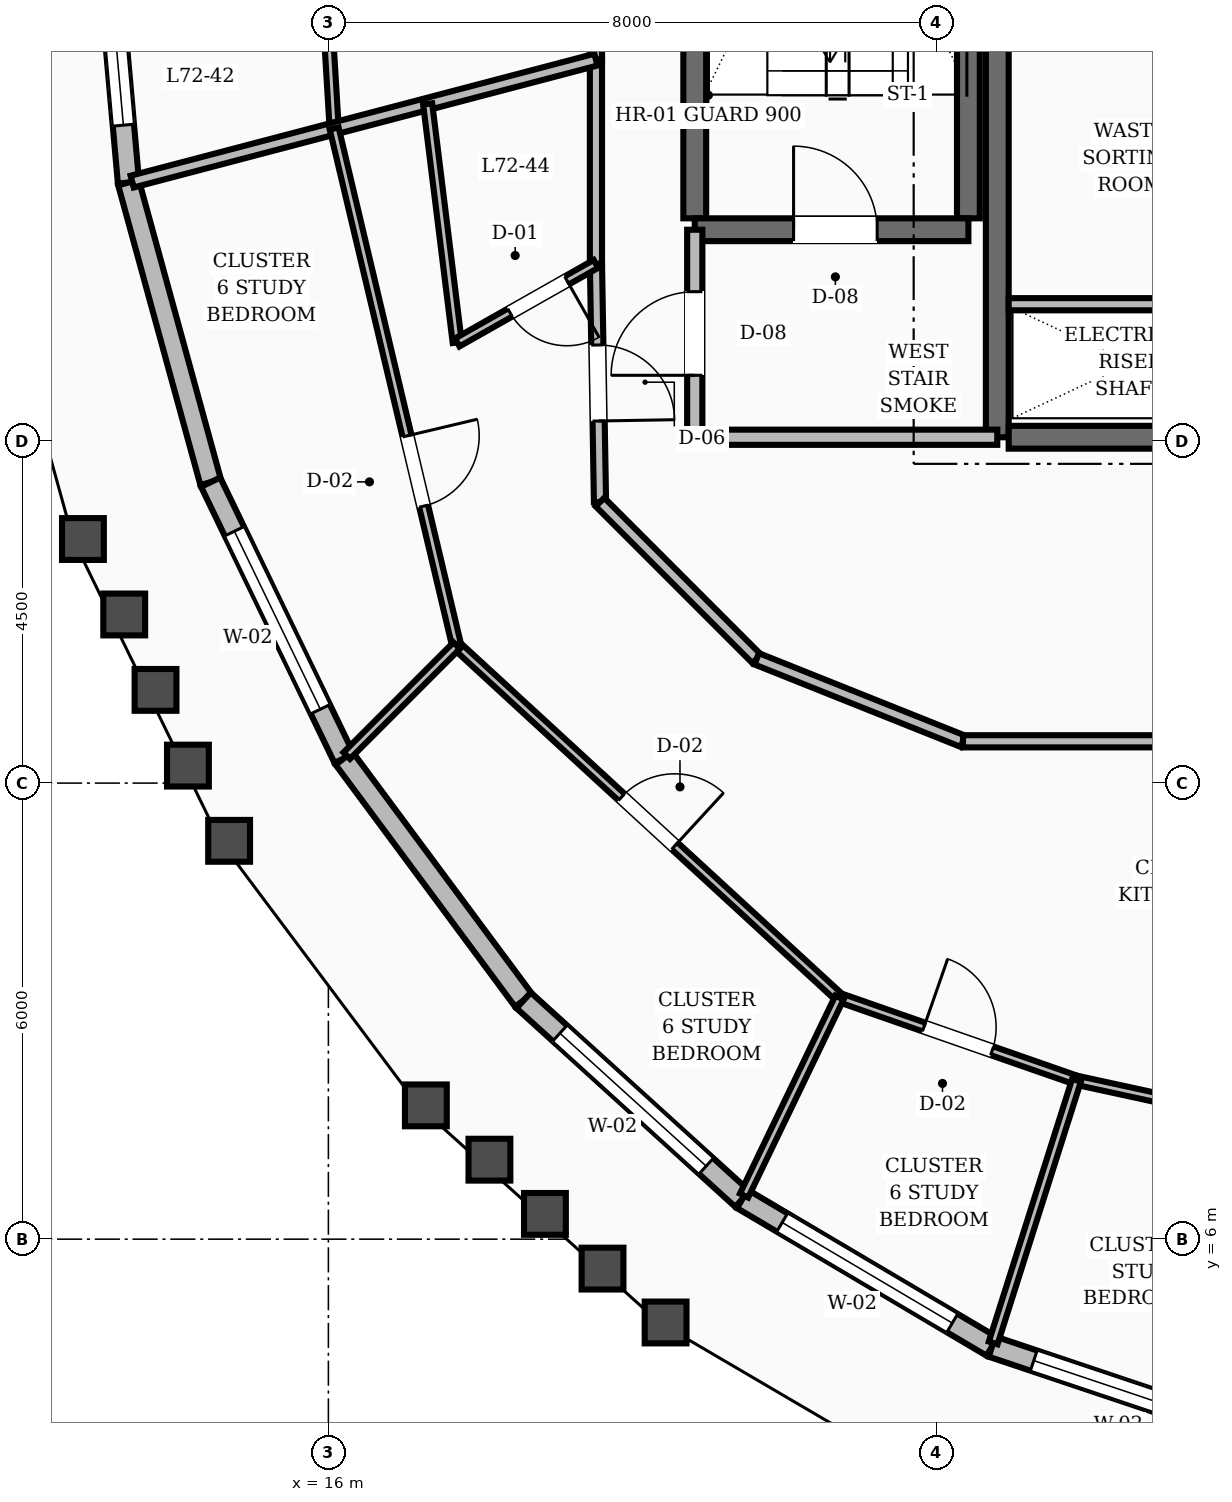
"""IFC4 building model, lengths in metres.
Left out: names, types, materials, properties, quantities, classifications, styles, units other than length and angle.
Written with IfcOpenShell. Run it as: python <this file> out.ifc"""

import sys

from ifc_helpers import new_model, si_unit, direction, frame, frame_2d, origin, place, context, subcontext, project, spatial, rectangle, extrude, element, fill, save


model = new_model("IFC4")
c1 = context("Model", 3, precision=1e-05, world=origin(), true_north=direction((0.0, 1.0)))
c2 = subcontext(c1, "Body", "Model", "MODEL_VIEW")
j1 = project(units=[si_unit("LENGTHUNIT", "METRE"), si_unit("PLANEANGLEUNIT", "RADIAN")], contexts=[c1])
p1 = place(None, origin())
s1 = spatial("IfcSite", under=j1, at=p1, CompositionType="ELEMENT")
p2 = place(p1, origin())
s2 = spatial("IfcBuilding", under=s1, at=p2, CompositionType="ELEMENT")
p3 = place(p2, frame((0.0, 0.0, 276.0)))
s3 = spatial("IfcBuildingStorey", under=s2, at=p3, CompositionType="ELEMENT", Elevation=276.0)
p4 = place(p3, frame((24.8, 16.55, 0.0), z_axis=(0.0, 0.0, 1.0), x_axis=(0.0, 1.0, 0.0)))
e1 = element("IfcWall", 1, at=p4, inside=s3, PredefinedType="SHEAR", context=c2, shape_type="SweptSolid", body=[
    extrude(rectangle(XDim=6.3, YDim=0.3, at=frame_2d((3.15, 0.0))), origin(), (0.0, 0.0, 1.0), 3.6),
])
p5 = place(p3, frame((24.95, 16.55, 0.0), z_axis=(0.0, 0.0, 1.0), x_axis=(1.0, 0.0, 0.0)))
e2 = element("IfcWall", 2, at=p5, inside=s3, PredefinedType="SHEAR", context=c2, shape_type="SweptSolid", body=[
    extrude(rectangle(XDim=3.25, YDim=0.3, at=frame_2d((1.625, 0.0))), origin(), (0.0, 0.0, 1.0), 3.6),
])
for number, where, z_axis, x_axis in (
    (3, (20.82, 19.43, 0.0), (0.0, 0.0, 1.0), (0.0, 1.0, 0.0)),
    (4, (24.42, 19.43, 0.0), (0.0, 0.0, 1.0), (0.0, 1.0, 0.0)),
):
    element("IfcWall", number, at=place(p3, frame(where, z_axis=z_axis, x_axis=x_axis)), inside=s3, PredefinedType="SHEAR", context=c2, shape_type="SweptSolid", body=[
        extrude(rectangle(XDim=8.74, YDim=0.3, at=frame_2d((4.37, 0.0))), origin(), (0.0, 0.0, 1.0), 3.6),
    ])
p6 = place(p3, frame((20.82, 19.28, 0.0), z_axis=(0.0, 0.0, 1.0), x_axis=(1.0, 0.0, 0.0)))
e5 = element("IfcWall", 5, at=p6, inside=s3, PredefinedType="SHEAR", context=c2, shape_type="SweptSolid", body=[
    extrude(rectangle(XDim=3.6, YDim=0.3, at=frame_2d((1.8, 0.0))), origin(), (0.0, 0.0, 1.0), 3.6),
])
p7 = place(p6, frame((1.3, 0.0, 0.0)))
e6 = element("IfcOpeningElement", 6, at=p7, cuts=e5, PredefinedType="OPENING", context=c2, shape_type="SweptSolid", body=[
    extrude(rectangle(XDim=1.1, YDim=2.1, at=frame_2d((0.55, 1.05))), frame((0.0, 0.16, 0.0), z_axis=(0.0, -1.0, 0.0), x_axis=(1.0, 0.0, 0.0)), (0.0, 0.0, 1.0), 0.32),
])
p8 = place(p3, frame((13.005, 24.0, 0.0), z_axis=(0.0, 0.0, 1.0), x_axis=(0.08868496751, -0.996059725387, 0.0)))
e7 = element("IfcWall", 7, at=p8, inside=s3, PredefinedType="STANDARD", context=c2, shape_type="SweptSolid", body=[
    extrude(rectangle(XDim=4.115, YDim=0.28, at=frame_2d((2.058, 0.0))), origin(), (0.0, 0.0, 1.0), 2.88),
])
p9 = place(p8, frame((0.758, 0.0, 0.8)))
e8 = element("IfcOpeningElement", 8, at=p9, cuts=e7, PredefinedType="OPENING", context=c2, shape_type="SweptSolid", body=[
    extrude(rectangle(XDim=2.6, YDim=1.65, at=frame_2d((1.3, 0.825))), frame((0.0, 0.15, 0.0), z_axis=(0.0, -1.0, 0.0), x_axis=(1.0, 0.0, 0.0)), (0.0, 0.0, 1.0), 0.3),
])
p10 = place(p3, frame((13.37, 19.901, 0.0), z_axis=(0.0, 0.0, 1.0), x_axis=(0.264426176781, -0.964405929592, 0.0)))
e9 = element("IfcWall", 9, at=p10, inside=s3, PredefinedType="STANDARD", context=c2, shape_type="SweptSolid", body=[
    extrude(rectangle(XDim=4.087, YDim=0.28, at=frame_2d((2.044, 0.0))), origin(), (0.0, 0.0, 1.0), 2.88),
])
p11 = place(p3, frame((14.451, 15.959, 0.0), z_axis=(0.0, 0.0, 1.0), x_axis=(0.435070554904, -0.900396363973, 0.0)))
e10 = element("IfcWall", 10, at=p11, inside=s3, PredefinedType="STANDARD", context=c2, shape_type="SweptSolid", body=[
    extrude(rectangle(XDim=4.035, YDim=0.28, at=frame_2d((2.017, 0.0))), origin(), (0.0, 0.0, 1.0), 2.88),
])
p12 = place(p11, frame((0.717, 0.0, 0.8)))
e11 = element("IfcOpeningElement", 11, at=p12, cuts=e10, PredefinedType="OPENING", context=c2, shape_type="SweptSolid", body=[
    extrude(rectangle(XDim=2.6, YDim=1.65, at=frame_2d((1.3, 0.825))), frame((0.0, 0.15, 0.0), z_axis=(0.0, -1.0, 0.0), x_axis=(1.0, 0.0, 0.0)), (0.0, 0.0, 1.0), 0.3),
])
p13 = place(p3, frame((16.206, 12.326, 0.0), z_axis=(0.0, 0.0, 1.0), x_axis=(0.595834112452, -0.803107533546, 0.0)))
e12 = element("IfcWall", 12, at=p13, inside=s3, PredefinedType="STANDARD", context=c2, shape_type="SweptSolid", body=[
    extrude(rectangle(XDim=3.965, YDim=0.28, at=frame_2d((1.982, 0.0))), origin(), (0.0, 0.0, 1.0), 2.88),
])
p14 = place(p3, frame((18.569, 9.142, 0.0), z_axis=(0.0, 0.0, 1.0), x_axis=(0.740383189604, -0.672185043386, 0.0)))
e13 = element("IfcWall", 13, at=p14, inside=s3, PredefinedType="STANDARD", context=c2, shape_type="SweptSolid", body=[
    extrude(rectangle(XDim=3.888, YDim=0.28, at=frame_2d((1.944, 0.0))), origin(), (0.0, 0.0, 1.0), 2.88),
])
p15 = place(p14, frame((0.644, 0.0, 0.8)))
e14 = element("IfcOpeningElement", 14, at=p15, cuts=e13, PredefinedType="OPENING", context=c2, shape_type="SweptSolid", body=[
    extrude(rectangle(XDim=2.6, YDim=1.65, at=frame_2d((1.3, 0.825))), frame((0.0, 0.15, 0.0), z_axis=(0.0, -1.0, 0.0), x_axis=(1.0, 0.0, 0.0)), (0.0, 0.0, 1.0), 0.3),
])
p16 = place(p3, frame((21.447, 6.529, 0.0), z_axis=(0.0, 0.0, 1.0), x_axis=(0.860795275747, -0.508951366294, 0.0)))
e15 = element("IfcWall", 15, at=p16, inside=s3, PredefinedType="STANDARD", context=c2, shape_type="SweptSolid", body=[
    extrude(rectangle(XDim=3.815, YDim=0.28, at=frame_2d((1.907, 0.0))), origin(), (0.0, 0.0, 1.0), 2.88),
])
p17 = place(p16, frame((0.608, 0.0, 0.8)))
e16 = element("IfcOpeningElement", 16, at=p17, cuts=e15, PredefinedType="OPENING", context=c2, shape_type="SweptSolid", body=[
    extrude(rectangle(XDim=2.6, YDim=1.65, at=frame_2d((1.3, 0.825))), frame((0.0, 0.15, 0.0), z_axis=(0.0, -1.0, 0.0), x_axis=(1.0, 0.0, 0.0)), (0.0, 0.0, 1.0), 0.3),
])
p18 = place(p3, frame((24.731, 4.587, 0.0), z_axis=(0.0, 0.0, 1.0), x_axis=(0.948038268377, -0.318156316445, 0.0)))
e17 = element("IfcWall", 17, at=p18, inside=s3, PredefinedType="STANDARD", context=c2, shape_type="SweptSolid", body=[
    extrude(rectangle(XDim=3.759, YDim=0.28, at=frame_2d((1.879, 0.0))), origin(), (0.0, 0.0, 1.0), 2.88),
])
p19 = place(p18, frame((0.579, 0.0, 0.8)))
e18 = element("IfcOpeningElement", 18, at=p19, cuts=e17, PredefinedType="OPENING", context=c2, shape_type="SweptSolid", body=[
    extrude(rectangle(XDim=2.6, YDim=1.65, at=frame_2d((1.3, 0.825))), frame((0.0, 0.15, 0.0), z_axis=(0.0, -1.0, 0.0), x_axis=(1.0, 0.0, 0.0)), (0.0, 0.0, 1.0), 0.3),
])
p20 = place(p3, frame((20.82, 16.55, 0.0), z_axis=(0.0, 0.0, 1.0), x_axis=(0.0, 1.0, 0.0)))
e19 = element("IfcWall", 19, at=p20, inside=s3, PredefinedType="SOLIDWALL", context=c2, shape_type="SweptSolid", body=[
    extrude(rectangle(XDim=2.73, YDim=0.2, at=frame_2d((1.365, 0.0))), origin(), (0.0, 0.0, 1.0), 2.87),
])
p21 = place(p20, frame((0.815, 0.0, 0.0)))
e20 = element("IfcOpeningElement", 20, at=p21, cuts=e19, PredefinedType="OPENING", context=c2, shape_type="SweptSolid", body=[
    extrude(rectangle(XDim=1.1, YDim=2.1, at=frame_2d((0.55, 1.05))), frame((0.0, 0.11, 0.0), z_axis=(0.0, -1.0, 0.0), x_axis=(1.0, 0.0, 0.0)), (0.0, 0.0, 1.0), 0.22),
])
p22 = place(p3, frame((20.82, 16.55, 0.0), z_axis=(0.0, 0.0, 1.0), x_axis=(1.0, 0.0, 0.0)))
e21 = element("IfcWall", 21, at=p22, inside=s3, PredefinedType="SOLIDWALL", context=c2, shape_type="SweptSolid", body=[
    extrude(rectangle(XDim=3.98, YDim=0.2, at=frame_2d((1.99, 0.0))), origin(), (0.0, 0.0, 1.0), 2.87),
])
p23 = place(p3, frame((24.95, 18.3, 0.0), z_axis=(0.0, 0.0, 1.0), x_axis=(1.0, 0.0, 0.0)))
e22 = element("IfcWall", 22, at=p23, inside=s3, PredefinedType="SOLIDWALL", context=c2, shape_type="SweptSolid", body=[
    extrude(rectangle(XDim=3.2, YDim=0.16, at=frame_2d((1.6, 0.0))), origin(), (0.0, 0.0, 1.0), 2.87),
])
p24 = place(p3, frame((19.52, 24.0, 0.0), z_axis=(0.0, 0.0, 1.0), x_axis=(0.0, -1.0, 0.0)))
e23 = element("IfcWall", 23, at=p24, inside=s3, PredefinedType="SOLIDWALL", context=c2, shape_type="SweptSolid", body=[
    extrude(rectangle(XDim=2.482, YDim=0.16, at=frame_2d((1.241, 0.0))), origin(), (0.0, 0.0, 1.0), 2.87),
])
p25 = place(p3, frame((19.52, 21.518, 0.0), z_axis=(0.0, 0.0, 1.0), x_axis=(0.0, -1.0, 0.0)))
e24 = element("IfcWall", 24, at=p25, inside=s3, PredefinedType="SOLIDWALL", context=c2, shape_type="SweptSolid", body=[
    extrude(rectangle(XDim=2.687, YDim=0.16, at=frame_2d((1.344, 0.0))), origin(), (0.0, 0.0, 1.0), 2.87),
])
p26 = place(p3, frame((19.52, 18.831, 0.0), z_axis=(0.0, 0.0, 1.0), x_axis=(0.016981035134, -0.999855811828, 0.0)))
e25 = element("IfcWall", 25, at=p26, inside=s3, PredefinedType="SOLIDWALL", context=c2, shape_type="SweptSolid", body=[
    extrude(rectangle(XDim=3.134, YDim=0.16, at=frame_2d((1.567, 0.0))), origin(), (0.0, 0.0, 1.0), 2.87),
])
p27 = place(p26, frame((1.067, 0.0, 0.0)))
e26 = element("IfcOpeningElement", 26, at=p27, cuts=e25, PredefinedType="OPENING", context=c2, shape_type="SweptSolid", body=[
    extrude(rectangle(XDim=1.0, YDim=2.1, at=frame_2d((0.5, 1.05))), frame((0.0, 0.09, 0.0), z_axis=(0.0, -1.0, 0.0), x_axis=(1.0, 0.0, 0.0)), (0.0, 0.0, 1.0), 0.18),
])
p28 = place(p3, frame((19.573, 15.697, 0.0), z_axis=(0.0, 0.0, 1.0), x_axis=(0.707106781187, -0.707106781187, 0.0)))
e27 = element("IfcWall", 27, at=p28, inside=s3, PredefinedType="SOLIDWALL", context=c2, shape_type="SweptSolid", body=[
    extrude(rectangle(XDim=2.916, YDim=0.16, at=frame_2d((1.458, 0.0))), origin(), (0.0, 0.0, 1.0), 2.87),
])
p29 = place(p3, frame((21.635, 13.635, 0.0), z_axis=(0.0, 0.0, 1.0), x_axis=(0.92856882165, -0.371160266542, 0.0)))
e28 = element("IfcWall", 28, at=p29, inside=s3, PredefinedType="SOLIDWALL", context=c2, shape_type="SweptSolid", body=[
    extrude(rectangle(XDim=2.923, YDim=0.16, at=frame_2d((1.461, 0.0))), origin(), (0.0, 0.0, 1.0), 2.87),
])
p30 = place(p3, frame((24.349, 12.55, 0.0), z_axis=(0.0, 0.0, 1.0), x_axis=(1.0, 0.0, 0.0)))
e29 = element("IfcWall", 29, at=p30, inside=s3, PredefinedType="SOLIDWALL", context=c2, shape_type="SweptSolid", body=[
    extrude(rectangle(XDim=2.908, YDim=0.16, at=frame_2d((1.454, 0.0))), origin(), (0.0, 0.0, 1.0), 2.87),
])
p31 = place(p3, frame((15.872, 24.0, 0.0), z_axis=(0.0, 0.0, 1.0), x_axis=(0.060277885003, -0.998181635064, 0.0)))
e30 = element("IfcWall", 30, at=p31, inside=s3, PredefinedType="PARTITIONING", context=c2, shape_type="SweptSolid", body=[
    extrude(rectangle(XDim=3.394, YDim=0.12, at=frame_2d((1.697, 0.0))), origin(), (0.0, 0.0, 1.0), 2.87),
])
p32 = place(p31, frame((1.222, 0.0, 0.0)))
e31 = element("IfcOpeningElement", 31, at=p32, cuts=e30, PredefinedType="OPENING", context=c2, shape_type="SweptSolid", body=[
    extrude(rectangle(XDim=0.95, YDim=2.1, at=frame_2d((0.475, 1.05))), frame((0.0, 0.07, 0.0), z_axis=(0.0, -1.0, 0.0), x_axis=(1.0, 0.0, 0.0)), (0.0, 0.0, 1.0), 0.14),
])
p33 = place(p3, frame((19.52, 21.518, 0.0), z_axis=(0.0, 0.0, 1.0), x_axis=(-0.967130154466, -0.254281859995, 0.0)))
e32 = element("IfcWall", 32, at=p33, inside=s3, PredefinedType="SOLIDWALL", context=c2, shape_type="SweptSolid", body=[
    extrude(rectangle(XDim=6.309, YDim=0.16, at=frame_2d((3.154, 0.0))), origin(), (0.0, 0.0, 1.0), 2.87),
])
p34 = place(p3, frame((17.306, 20.936, 0.0), z_axis=(0.0, 0.0, 1.0), x_axis=(0.12312261881, -0.99239146547, 0.0)))
e33 = element("IfcWall", 33, at=p34, inside=s3, PredefinedType="PARTITIONING", context=c2, shape_type="SweptSolid", body=[
    extrude(rectangle(XDim=3.163, YDim=0.12, at=frame_2d((1.582, 0.0))), origin(), (0.0, 0.0, 1.0), 2.87),
])
p35 = place(p3, frame((19.52, 18.831, 0.0), z_axis=(0.0, 0.0, 1.0), x_axis=(-0.870085428534, -0.49290095055, 0.0)))
e34 = element("IfcWall", 34, at=p35, inside=s3, PredefinedType="PARTITIONING", context=c2, shape_type="SweptSolid", body=[
    extrude(rectangle(XDim=2.097, YDim=0.12, at=frame_2d((1.049, 0.0))), origin(), (0.0, 0.0, 1.0), 2.87),
])
p36 = place(p35, frame((0.44, 0.0, 0.0)))
e35 = element("IfcOpeningElement", 35, at=p36, cuts=e34, PredefinedType="OPENING", context=c2, shape_type="SweptSolid", body=[
    extrude(rectangle(XDim=0.86, YDim=2.1, at=frame_2d((0.43, 1.05))), frame((0.0, 0.07, 0.0), z_axis=(0.0, -1.0, 0.0), x_axis=(1.0, 0.0, 0.0)), (0.0, 0.0, 1.0), 0.14),
])
p37 = place(p3, frame((16.076, 20.612, 0.0), z_axis=(0.0, 0.0, 1.0), x_axis=(0.230512502036, -0.973069363615, 0.0)))
e36 = element("IfcWall", 36, at=p37, inside=s3, PredefinedType="PARTITIONING", context=c2, shape_type="SweptSolid", body=[
    extrude(rectangle(XDim=6.991, YDim=0.12, at=frame_2d((3.496, 0.0))), origin(), (0.0, 0.0, 1.0), 2.87),
])
p38 = place(p37, frame((4.156, 0.0, 0.0)))
e37 = element("IfcOpeningElement", 37, at=p38, cuts=e36, PredefinedType="OPENING", context=c2, shape_type="SweptSolid", body=[
    extrude(rectangle(XDim=0.95, YDim=2.1, at=frame_2d((0.475, 1.05))), frame((0.0, 0.07, 0.0), z_axis=(0.0, -1.0, 0.0), x_axis=(1.0, 0.0, 0.0)), (0.0, 0.0, 1.0), 0.14),
])
p39 = place(p3, frame((17.688, 13.809, 0.0), z_axis=(0.0, 0.0, 1.0), x_axis=(0.736103094718, -0.67686943641, 0.0)))
e38 = element("IfcWall", 38, at=p39, inside=s3, PredefinedType="PARTITIONING", context=c2, shape_type="SweptSolid", body=[
    extrude(rectangle(XDim=6.842, YDim=0.12, at=frame_2d((3.421, 0.0))), origin(), (0.0, 0.0, 1.0), 2.87),
])
p40 = place(p39, frame((2.946, 0.0, 0.0)))
e39 = element("IfcOpeningElement", 39, at=p40, cuts=e38, PredefinedType="OPENING", context=c2, shape_type="SweptSolid", body=[
    extrude(rectangle(XDim=0.95, YDim=2.1, at=frame_2d((0.475, 1.05))), frame((0.0, 0.07, 0.0), z_axis=(0.0, -1.0, 0.0), x_axis=(1.0, 0.0, 0.0)), (0.0, 0.0, 1.0), 0.14),
])
p41 = place(p3, frame((17.688, 13.809, 0.0), z_axis=(0.0, 0.0, 1.0), x_axis=(-0.706689063462, -0.707524252293, 0.0)))
e40 = element("IfcWall", 40, at=p41, inside=s3, PredefinedType="PARTITIONING", context=c2, shape_type="SweptSolid", body=[
    extrude(rectangle(XDim=2.046, YDim=0.12, at=frame_2d((1.023, 0.0))), origin(), (0.0, 0.0, 1.0), 2.87),
])
p42 = place(p3, frame((22.724, 9.178, 0.0), z_axis=(0.0, 0.0, 1.0), x_axis=(0.944239204451, -0.329260269054, 0.0)))
e41 = element("IfcWall", 41, at=p42, inside=s3, PredefinedType="PARTITIONING", context=c2, shape_type="SweptSolid", body=[
    extrude(rectangle(XDim=3.302, YDim=0.12, at=frame_2d((1.651, 0.0))), origin(), (0.0, 0.0, 1.0), 2.87),
])
p43 = place(p42, frame((1.176, 0.0, 0.0)))
e42 = element("IfcOpeningElement", 42, at=p43, cuts=e41, PredefinedType="OPENING", context=c2, shape_type="SweptSolid", body=[
    extrude(rectangle(XDim=0.95, YDim=2.1, at=frame_2d((0.475, 1.05))), frame((0.0, 0.07, 0.0), z_axis=(0.0, -1.0, 0.0), x_axis=(1.0, 0.0, 0.0)), (0.0, 0.0, 1.0), 0.14),
])
p44 = place(p3, frame((22.724, 9.178, 0.0), z_axis=(0.0, 0.0, 1.0), x_axis=(-0.434196411504, -0.900818225968, 0.0)))
e43 = element("IfcWall", 43, at=p44, inside=s3, PredefinedType="PARTITIONING", context=c2, shape_type="SweptSolid", body=[
    extrude(rectangle(XDim=2.891, YDim=0.12, at=frame_2d((1.446, 0.0))), origin(), (0.0, 0.0, 1.0), 2.87),
])
p45 = place(p3, frame((25.843, 8.091, 0.0), z_axis=(0.0, 0.0, 1.0), x_axis=(0.977170072037, -0.21245858494, 0.0)))
e44 = element("IfcWall", 44, at=p45, inside=s3, PredefinedType="PARTITIONING", context=c2, shape_type="SweptSolid", body=[
    extrude(rectangle(XDim=3.152, YDim=0.12, at=frame_2d((1.576, 0.0))), origin(), (0.0, 0.0, 1.0), 2.87),
])
p46 = place(p45, frame((1.101, 0.0, 0.0)))
e45 = element("IfcOpeningElement", 45, at=p46, cuts=e44, PredefinedType="OPENING", context=c2, shape_type="SweptSolid", body=[
    extrude(rectangle(XDim=0.95, YDim=2.1, at=frame_2d((0.475, 1.05))), frame((0.0, 0.07, 0.0), z_axis=(0.0, -1.0, 0.0), x_axis=(1.0, 0.0, 0.0)), (0.0, 0.0, 1.0), 0.14),
])
p47 = place(p3, frame((25.843, 8.091, 0.0), z_axis=(0.0, 0.0, 1.0), x_axis=(-0.302397560597, -0.953181889959, 0.0)))
e46 = element("IfcWall", 46, at=p47, inside=s3, PredefinedType="PARTITIONING", context=c2, shape_type="SweptSolid", body=[
    extrude(rectangle(XDim=3.626, YDim=0.12, at=frame_2d((1.813, 0.0))), origin(), (0.0, 0.0, 1.0), 2.87),
])
p48 = place(p9, origin())
e47 = element("IfcWindow", 47, at=p48, inside=s3, PartitioningType="SINGLE_PANEL", PredefinedType="WINDOW", context=c2, shape_type="SweptSolid", body=[
    extrude(rectangle(XDim=2.6, YDim=1.65, at=frame_2d((1.3, 0.825))), frame((0.0, 0.03, 0.0), z_axis=(0.0, -1.0, 0.0), x_axis=(1.0, 0.0, 0.0)), (0.0, 0.0, 1.0), 0.06),
])
fill(e8, e47)
p49 = place(p12, origin())
e48 = element("IfcWindow", 48, at=p49, inside=s3, PartitioningType="SINGLE_PANEL", PredefinedType="WINDOW", context=c2, shape_type="SweptSolid", body=[
    extrude(rectangle(XDim=2.6, YDim=1.65, at=frame_2d((1.3, 0.825))), frame((0.0, 0.03, 0.0), z_axis=(0.0, -1.0, 0.0), x_axis=(1.0, 0.0, 0.0)), (0.0, 0.0, 1.0), 0.06),
])
fill(e11, e48)
p50 = place(p15, origin())
e49 = element("IfcWindow", 49, at=p50, inside=s3, PartitioningType="SINGLE_PANEL", PredefinedType="WINDOW", context=c2, shape_type="SweptSolid", body=[
    extrude(rectangle(XDim=2.6, YDim=1.65, at=frame_2d((1.3, 0.825))), frame((0.0, 0.03, 0.0), z_axis=(0.0, -1.0, 0.0), x_axis=(1.0, 0.0, 0.0)), (0.0, 0.0, 1.0), 0.06),
])
fill(e14, e49)
p51 = place(p17, origin())
e50 = element("IfcWindow", 50, at=p51, inside=s3, PartitioningType="SINGLE_PANEL", PredefinedType="WINDOW", context=c2, shape_type="SweptSolid", body=[
    extrude(rectangle(XDim=2.6, YDim=1.65, at=frame_2d((1.3, 0.825))), frame((0.0, 0.03, 0.0), z_axis=(0.0, -1.0, 0.0), x_axis=(1.0, 0.0, 0.0)), (0.0, 0.0, 1.0), 0.06),
])
fill(e16, e50)
p52 = place(p19, origin())
e51 = element("IfcWindow", 51, at=p52, inside=s3, PartitioningType="SINGLE_PANEL", PredefinedType="WINDOW", context=c2, shape_type="SweptSolid", body=[
    extrude(rectangle(XDim=2.6, YDim=1.65, at=frame_2d((1.3, 0.825))), frame((0.0, 0.03, 0.0), z_axis=(0.0, -1.0, 0.0), x_axis=(1.0, 0.0, 0.0)), (0.0, 0.0, 1.0), 0.06),
])
fill(e18, e51)
p53 = place(p7, origin())
e52 = element("IfcDoor", 52, at=p53, inside=s3, OperationType="SINGLE_SWING_LEFT", PredefinedType="DOOR", context=c2, shape_type="SweptSolid", body=[
    extrude(rectangle(XDim=1.1, YDim=2.1, at=frame_2d((0.55, 1.05))), frame((0.0, 0.025, 0.0), z_axis=(0.0, -1.0, 0.0), x_axis=(1.0, 0.0, 0.0)), (0.0, 0.0, 1.0), 0.05),
])
fill(e6, e52)
p54 = place(p21, origin())
e53 = element("IfcDoor", 53, at=p54, inside=s3, OperationType="SINGLE_SWING_LEFT", PredefinedType="DOOR", context=c2, shape_type="SweptSolid", body=[
    extrude(rectangle(XDim=1.1, YDim=2.1, at=frame_2d((0.55, 1.05))), frame((0.0, 0.025, 0.0), z_axis=(0.0, -1.0, 0.0), x_axis=(1.0, 0.0, 0.0)), (0.0, 0.0, 1.0), 0.05),
])
fill(e20, e53)
p55 = place(p36, origin())
e54 = element("IfcDoor", 54, at=p55, inside=s3, OperationType="SINGLE_SWING_LEFT", PredefinedType="DOOR", context=c2, shape_type="SweptSolid", body=[
    extrude(rectangle(XDim=0.86, YDim=2.1, at=frame_2d((0.43, 1.05))), frame((0.0, 0.025, 0.0), z_axis=(0.0, -1.0, 0.0), x_axis=(1.0, 0.0, 0.0)), (0.0, 0.0, 1.0), 0.05),
])
fill(e35, e54)
p56 = place(p27, origin())
e55 = element("IfcDoor", 55, at=p56, inside=s3, OperationType="SINGLE_SWING_RIGHT", PredefinedType="DOOR", context=c2, shape_type="SweptSolid", body=[
    extrude(rectangle(XDim=1.0, YDim=2.1, at=frame_2d((0.5, 1.05))), frame((0.0, 0.025, 0.0), z_axis=(0.0, -1.0, 0.0), x_axis=(1.0, 0.0, 0.0)), (0.0, 0.0, 1.0), 0.05),
])
fill(e26, e55)
p57 = place(p38, origin())
e56 = element("IfcDoor", 56, at=p57, inside=s3, OperationType="SINGLE_SWING_LEFT", PredefinedType="DOOR", context=c2, shape_type="SweptSolid", body=[
    extrude(rectangle(XDim=0.95, YDim=2.1, at=frame_2d((0.475, 1.05))), frame((0.0, 0.025, 0.0), z_axis=(0.0, -1.0, 0.0), x_axis=(1.0, 0.0, 0.0)), (0.0, 0.0, 1.0), 0.05),
])
fill(e37, e56)
p58 = place(p40, origin())
e57 = element("IfcDoor", 57, at=p58, inside=s3, OperationType="SINGLE_SWING_RIGHT", PredefinedType="DOOR", context=c2, shape_type="SweptSolid", body=[
    extrude(rectangle(XDim=0.95, YDim=2.1, at=frame_2d((0.475, 1.05))), frame((0.0, 0.025, 0.0), z_axis=(0.0, -1.0, 0.0), x_axis=(1.0, 0.0, 0.0)), (0.0, 0.0, 1.0), 0.05),
])
fill(e39, e57)
p59 = place(p43, origin())
e58 = element("IfcDoor", 58, at=p59, inside=s3, OperationType="SINGLE_SWING_LEFT", PredefinedType="DOOR", context=c2, shape_type="SweptSolid", body=[
    extrude(rectangle(XDim=0.95, YDim=2.1, at=frame_2d((0.475, 1.05))), frame((0.0, 0.025, 0.0), z_axis=(0.0, -1.0, 0.0), x_axis=(1.0, 0.0, 0.0)), (0.0, 0.0, 1.0), 0.05),
])
fill(e42, e58)
save(model, sys.argv[1])
